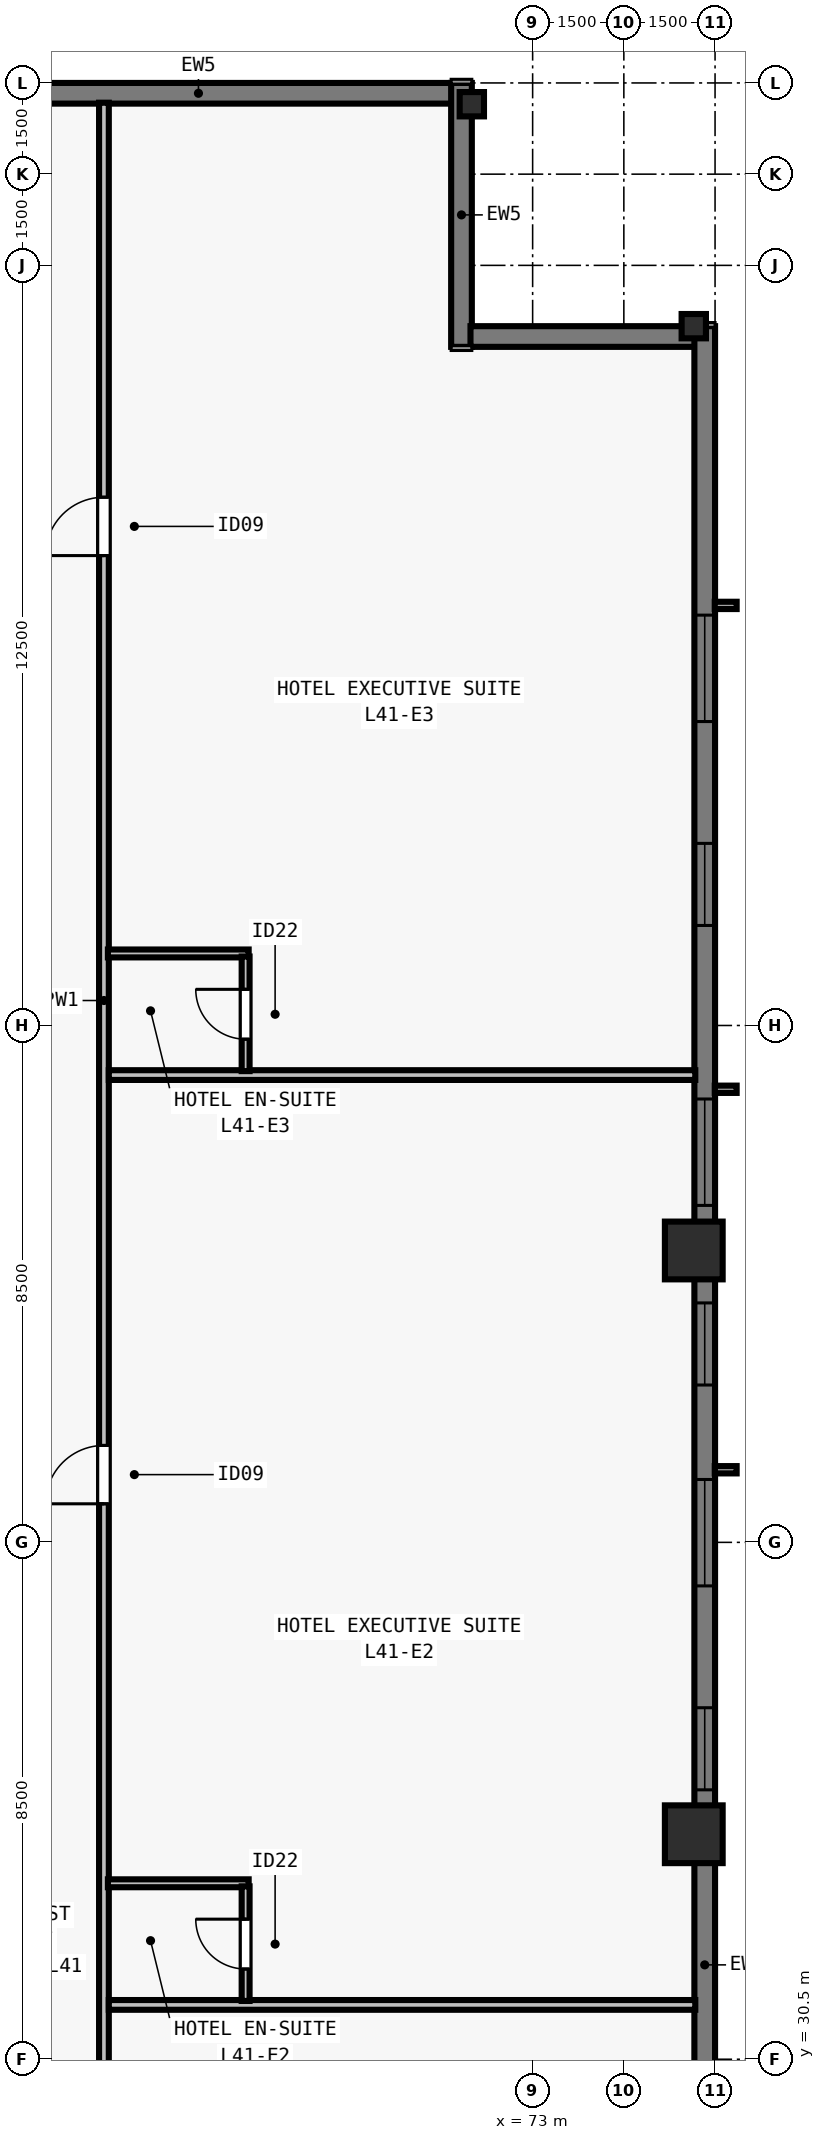
"""IFC4 building model, lengths in metres.
Left out: names, types, materials, properties, quantities, classifications, styles, units other than length and angle.
Written with IfcOpenShell. Run it as: python <this file> out.ifc"""

import sys

from ifc_helpers import new_model, si_unit, direction, frame, frame_2d, origin, origin_2d, place, context, subcontext, project, spatial, rectangle, i_section, extrude, element, fill, save


model = new_model("IFC4")
c1 = context("Model", 3, precision=1e-05, world=origin(), true_north=direction((0.0, 1.0)))
c2 = subcontext(c1, "Body", "Model", "MODEL_VIEW")
j1 = project(units=[si_unit("LENGTHUNIT", "METRE"), si_unit("PLANEANGLEUNIT", "RADIAN")], contexts=[c1])
p1 = place(None, origin())
s1 = spatial("IfcSite", under=j1, at=p1, CompositionType="ELEMENT")
p2 = place(p1, origin())
s2 = spatial("IfcBuilding", under=s1, at=p2, CompositionType="ELEMENT")
p3 = place(p2, frame((0.0, 0.0, 151.5)))
s3 = spatial("IfcBuildingStorey", under=s2, at=p3, CompositionType="ELEMENT", Elevation=151.5)
for number, where, z_axis, x_axis in (
    (1, (75.65, 34.2, 0.0), (0.0, 0.0, 1.0), (0.0, 1.0, 0.0)),
    (2, (75.65, 43.8, 0.0), (0.0, 0.0, 1.0), (0.0, 1.0, 0.0)),
):
    element("IfcColumn", number, at=place(p3, frame(where, z_axis=z_axis, x_axis=x_axis)), inside=s3, PredefinedType="COLUMN", context=c2, shape_type="SweptSolid", body=[
        extrude(rectangle(XDim=0.95, YDim=0.95, at=origin_2d()), origin(), (0.0, 0.0, 1.0), 3.5),
    ])
for number, where, z_axis, x_axis in (
    (3, (75.65, 59.0, 0.0), (0.0, 0.0, 1.0), (0.0, 1.0, 0.0)),
    (4, (72.0, 62.65, 0.0), (0.0, 0.0, 1.0), (1.0, 0.0, 0.0)),
):
    element("IfcColumn", number, at=place(p3, frame(where, z_axis=z_axis, x_axis=x_axis)), inside=s3, PredefinedType="COLUMN", context=c2, shape_type="SweptSolid", body=[
        extrude(i_section(OverallWidth=0.4, OverallDepth=0.4, WebThickness=0.022, FlangeThickness=0.036, at=origin_2d()), origin(), (0.0, 0.0, 1.0), 3.5),
    ])
p4 = place(p3, frame((32.0, 62.83, 0.0), z_axis=(0.0, 0.0, 1.0), x_axis=(1.0, 0.0, 0.0)))
e5 = element("IfcWall", 5, at=p4, inside=s3, PredefinedType="SOLIDWALL", context=c2, shape_type="SweptSolid", body=[
    extrude(rectangle(XDim=39.682, YDim=0.34, at=frame_2d((19.841, 0.0))), origin(), (0.0, 0.0, 1.0), 3.28),
])
p5 = place(p4, frame((4.752, 0.0, 0.8)))
e6 = element("IfcOpeningElement", 6, at=p5, cuts=e5, PredefinedType="OPENING", context=c2, shape_type="SweptSolid", body=[
    extrude(rectangle(XDim=1.75, YDim=1.66, at=frame_2d((0.875, 0.83))), frame((0.0, 0.18, 0.0), z_axis=(0.0, -1.0, 0.0), x_axis=(1.0, 0.0, 0.0)), (0.0, 0.0, 1.0), 0.36),
])
p6 = place(p4, frame((11.859, 0.0, 0.8)))
e7 = element("IfcOpeningElement", 7, at=p6, cuts=e5, PredefinedType="OPENING", context=c2, shape_type="SweptSolid", body=[
    extrude(rectangle(XDim=1.75, YDim=1.66, at=frame_2d((0.875, 0.83))), frame((0.0, 0.18, 0.0), z_axis=(0.0, -1.0, 0.0), x_axis=(1.0, 0.0, 0.0)), (0.0, 0.0, 1.0), 0.36),
])
p7 = place(p4, frame((16.062, 0.0, 0.8)))
e8 = element("IfcOpeningElement", 8, at=p7, cuts=e5, PredefinedType="OPENING", context=c2, shape_type="SweptSolid", body=[
    extrude(rectangle(XDim=1.35, YDim=1.66, at=frame_2d((0.675, 0.83))), frame((0.0, 0.18, 0.0), z_axis=(0.0, -1.0, 0.0), x_axis=(1.0, 0.0, 0.0)), (0.0, 0.0, 1.0), 0.36),
])
p8 = place(p4, frame((17.716, 0.0, 0.8)))
e9 = element("IfcOpeningElement", 9, at=p8, cuts=e5, PredefinedType="OPENING", context=c2, shape_type="SweptSolid", body=[
    extrude(rectangle(XDim=1.75, YDim=1.66, at=frame_2d((0.875, 0.83))), frame((0.0, 0.18, 0.0), z_axis=(0.0, -1.0, 0.0), x_axis=(1.0, 0.0, 0.0)), (0.0, 0.0, 1.0), 0.36),
])
p9 = place(p4, frame((22.719, 0.0, 0.8)))
e10 = element("IfcOpeningElement", 10, at=p9, cuts=e5, PredefinedType="OPENING", context=c2, shape_type="SweptSolid", body=[
    extrude(rectangle(XDim=1.35, YDim=1.66, at=frame_2d((0.675, 0.83))), frame((0.0, 0.18, 0.0), z_axis=(0.0, -1.0, 0.0), x_axis=(1.0, 0.0, 0.0)), (0.0, 0.0, 1.0), 0.36),
])
p10 = place(p4, frame((26.073, 0.0, 0.8)))
e11 = element("IfcOpeningElement", 11, at=p10, cuts=e5, PredefinedType="OPENING", context=c2, shape_type="SweptSolid", body=[
    extrude(rectangle(XDim=1.75, YDim=1.66, at=frame_2d((0.875, 0.83))), frame((0.0, 0.18, 0.0), z_axis=(0.0, -1.0, 0.0), x_axis=(1.0, 0.0, 0.0)), (0.0, 0.0, 1.0), 0.36),
])
p11 = place(p4, frame((29.827, 0.0, 0.8)))
e12 = element("IfcOpeningElement", 12, at=p11, cuts=e5, PredefinedType="OPENING", context=c2, shape_type="SweptSolid", body=[
    extrude(rectangle(XDim=1.35, YDim=1.66, at=frame_2d((0.675, 0.83))), frame((0.0, 0.18, 0.0), z_axis=(0.0, -1.0, 0.0), x_axis=(1.0, 0.0, 0.0)), (0.0, 0.0, 1.0), 0.36),
])
p12 = place(p3, frame((71.83, 63.0, 0.0), z_axis=(0.0, 0.0, 1.0), x_axis=(0.0, -1.0, 0.0)))
e13 = element("IfcWall", 13, at=p12, inside=s3, PredefinedType="SOLIDWALL", context=c2, shape_type="SweptSolid", body=[
    extrude(rectangle(XDim=4.34, YDim=0.34, at=frame_2d((2.17, 0.0))), origin(), (0.0, 0.0, 1.0), 3.28),
])
p13 = place(p3, frame((71.978, 58.83, 0.0), z_axis=(0.0, 0.0, 1.0), x_axis=(1.0, 0.0, 0.0)))
e14 = element("IfcWall", 14, at=p13, inside=s3, PredefinedType="SOLIDWALL", context=c2, shape_type="SweptSolid", body=[
    extrude(rectangle(XDim=3.704, YDim=0.34, at=frame_2d((1.852, 0.0))), origin(), (0.0, 0.0, 1.0), 3.28),
])
p14 = place(p3, frame((75.83, 59.0, 0.0), z_axis=(0.0, 0.0, 1.0), x_axis=(0.0, -1.0, 0.0)))
e15 = element("IfcWall", 15, at=p14, inside=s3, PredefinedType="SOLIDWALL", context=c2, shape_type="SweptSolid", body=[
    extrude(rectangle(XDim=39.682, YDim=0.34, at=frame_2d((19.841, 0.0))), origin(), (0.0, 0.0, 1.0), 3.28),
])
p15 = place(p14, frame((4.752, 0.0, 0.8)))
e16 = element("IfcOpeningElement", 16, at=p15, cuts=e15, PredefinedType="OPENING", context=c2, shape_type="SweptSolid", body=[
    extrude(rectangle(XDim=1.75, YDim=1.66, at=frame_2d((0.875, 0.83))), frame((0.0, 0.18, 0.0), z_axis=(0.0, -1.0, 0.0), x_axis=(1.0, 0.0, 0.0)), (0.0, 0.0, 1.0), 0.36),
])
p16 = place(p14, frame((8.505, 0.0, 0.8)))
e17 = element("IfcOpeningElement", 17, at=p16, cuts=e15, PredefinedType="OPENING", context=c2, shape_type="SweptSolid", body=[
    extrude(rectangle(XDim=1.35, YDim=1.66, at=frame_2d((0.675, 0.83))), frame((0.0, 0.18, 0.0), z_axis=(0.0, -1.0, 0.0), x_axis=(1.0, 0.0, 0.0)), (0.0, 0.0, 1.0), 0.36),
])
p17 = place(p14, frame((12.709, 0.0, 0.8)))
e18 = element("IfcOpeningElement", 18, at=p17, cuts=e15, PredefinedType="OPENING", context=c2, shape_type="SweptSolid", body=[
    extrude(rectangle(XDim=1.75, YDim=1.66, at=frame_2d((0.875, 0.83))), frame((0.0, 0.18, 0.0), z_axis=(0.0, -1.0, 0.0), x_axis=(1.0, 0.0, 0.0)), (0.0, 0.0, 1.0), 0.36),
])
p18 = place(p14, frame((16.062, 0.0, 0.8)))
e19 = element("IfcOpeningElement", 19, at=p18, cuts=e15, PredefinedType="OPENING", context=c2, shape_type="SweptSolid", body=[
    extrude(rectangle(XDim=1.35, YDim=1.66, at=frame_2d((0.675, 0.83))), frame((0.0, 0.18, 0.0), z_axis=(0.0, -1.0, 0.0), x_axis=(1.0, 0.0, 0.0)), (0.0, 0.0, 1.0), 0.36),
])
p19 = place(p14, frame((18.966, 0.0, 0.8)))
e20 = element("IfcOpeningElement", 20, at=p19, cuts=e15, PredefinedType="OPENING", context=c2, shape_type="SweptSolid", body=[
    extrude(rectangle(XDim=1.75, YDim=1.66, at=frame_2d((0.875, 0.83))), frame((0.0, 0.18, 0.0), z_axis=(0.0, -1.0, 0.0), x_axis=(1.0, 0.0, 0.0)), (0.0, 0.0, 1.0), 0.36),
])
p20 = place(p14, frame((22.719, 0.0, 0.8)))
e21 = element("IfcOpeningElement", 21, at=p20, cuts=e15, PredefinedType="OPENING", context=c2, shape_type="SweptSolid", body=[
    extrude(rectangle(XDim=1.35, YDim=1.66, at=frame_2d((0.675, 0.83))), frame((0.0, 0.18, 0.0), z_axis=(0.0, -1.0, 0.0), x_axis=(1.0, 0.0, 0.0)), (0.0, 0.0, 1.0), 0.36),
])
p21 = place(p14, frame((29.827, 0.0, 0.8)))
e22 = element("IfcOpeningElement", 22, at=p21, cuts=e15, PredefinedType="OPENING", context=c2, shape_type="SweptSolid", body=[
    extrude(rectangle(XDim=1.35, YDim=1.66, at=frame_2d((0.675, 0.83))), frame((0.0, 0.18, 0.0), z_axis=(0.0, -1.0, 0.0), x_axis=(1.0, 0.0, 0.0)), (0.0, 0.0, 1.0), 0.36),
])
p22 = place(p14, frame((33.18, 0.0, 0.8)))
e23 = element("IfcOpeningElement", 23, at=p22, cuts=e15, PredefinedType="OPENING", context=c2, shape_type="SweptSolid", body=[
    extrude(rectangle(XDim=1.75, YDim=1.66, at=frame_2d((0.875, 0.83))), frame((0.0, 0.18, 0.0), z_axis=(0.0, -1.0, 0.0), x_axis=(1.0, 0.0, 0.0)), (0.0, 0.0, 1.0), 0.36),
])
p23 = place(p3, frame((65.95, 15.325, 0.0), z_axis=(0.0, 0.0, 1.0), x_axis=(0.0, 1.0, 0.0)))
e24 = element("IfcWall", 24, at=p23, inside=s3, PredefinedType="PARTITIONING", context=c2, shape_type="SweptSolid", body=[
    extrude(rectangle(XDim=47.35, YDim=0.16, at=frame_2d((23.675, 0.0))), origin(), (0.0, 0.0, 1.0), 2.555),
])
p24 = place(p23, frame((8.902, 0.0, 0.0)))
e25 = element("IfcOpeningElement", 25, at=p24, cuts=e24, PredefinedType="OPENING", context=c2, shape_type="SweptSolid", body=[
    extrude(rectangle(XDim=0.96, YDim=2.15, at=frame_2d((0.48, 1.075))), frame((0.0, 0.09, 0.0), z_axis=(0.0, -1.0, 0.0), x_axis=(1.0, 0.0, 0.0)), (0.0, 0.0, 1.0), 0.18),
])
p25 = place(p23, frame((24.309, 0.0, 0.0)))
e26 = element("IfcOpeningElement", 26, at=p25, cuts=e24, PredefinedType="OPENING", context=c2, shape_type="SweptSolid", body=[
    extrude(rectangle(XDim=0.96, YDim=2.15, at=frame_2d((0.48, 1.075))), frame((0.0, 0.09, 0.0), z_axis=(0.0, -1.0, 0.0), x_axis=(1.0, 0.0, 0.0)), (0.0, 0.0, 1.0), 0.18),
])
p26 = place(p23, frame((39.902, 0.0, 0.0)))
e27 = element("IfcOpeningElement", 27, at=p26, cuts=e24, PredefinedType="OPENING", context=c2, shape_type="SweptSolid", body=[
    extrude(rectangle(XDim=0.96, YDim=2.15, at=frame_2d((0.48, 1.075))), frame((0.0, 0.09, 0.0), z_axis=(0.0, -1.0, 0.0), x_axis=(1.0, 0.0, 0.0)), (0.0, 0.0, 1.0), 0.18),
])
p27 = place(p3, frame((66.03, 31.394, 0.0), z_axis=(0.0, 0.0, 1.0), x_axis=(1.0, 0.0, 0.0)))
e28 = element("IfcWall", 28, at=p27, inside=s3, PredefinedType="PARTITIONING", context=c2, shape_type="SweptSolid", body=[
    extrude(rectangle(XDim=9.645, YDim=0.16, at=frame_2d((4.823, 0.0))), origin(), (0.0, 0.0, 1.0), 3.28),
])
p28 = place(p3, frame((66.015, 33.394, 0.0), z_axis=(0.0, 0.0, 1.0), x_axis=(1.0, 0.0, 0.0)))
e29 = element("IfcWall", 29, at=p28, inside=s3, PredefinedType="PLUMBINGWALL", context=c2, shape_type="SweptSolid", body=[
    extrude(rectangle(XDim=2.315, YDim=0.13, at=frame_2d((1.158, 0.0))), origin(), (0.0, 0.0, 1.0), 3.28),
])
p29 = place(p3, frame((68.28, 31.458, 0.0), z_axis=(0.0, 0.0, 1.0), x_axis=(0.0, 1.0, 0.0)))
e30 = element("IfcWall", 30, at=p29, inside=s3, PredefinedType="PLUMBINGWALL", context=c2, shape_type="SweptSolid", body=[
    extrude(rectangle(XDim=1.885, YDim=0.13, at=frame_2d((0.942, 0.0))), origin(), (0.0, 0.0, 1.0), 3.28),
])
p30 = place(p29, frame((0.525, 0.0, 0.0)))
e31 = element("IfcOpeningElement", 31, at=p30, cuts=e30, PredefinedType="OPENING", context=c2, shape_type="SweptSolid", body=[
    extrude(rectangle(XDim=0.82, YDim=2.1, at=frame_2d((0.41, 1.05))), frame((0.0, 0.075, 0.0), z_axis=(0.0, -1.0, 0.0), x_axis=(1.0, 0.0, 0.0)), (0.0, 0.0, 1.0), 0.15),
])
p31 = place(p3, frame((66.03, 46.685, 0.0), z_axis=(0.0, 0.0, 1.0), x_axis=(1.0, 0.0, 0.0)))
e32 = element("IfcWall", 32, at=p31, inside=s3, PredefinedType="PARTITIONING", context=c2, shape_type="SweptSolid", body=[
    extrude(rectangle(XDim=9.645, YDim=0.16, at=frame_2d((4.823, 0.0))), origin(), (0.0, 0.0, 1.0), 3.28),
])
p32 = place(p3, frame((66.015, 48.685, 0.0), z_axis=(0.0, 0.0, 1.0), x_axis=(1.0, 0.0, 0.0)))
e33 = element("IfcWall", 33, at=p32, inside=s3, PredefinedType="PLUMBINGWALL", context=c2, shape_type="SweptSolid", body=[
    extrude(rectangle(XDim=2.315, YDim=0.13, at=frame_2d((1.158, 0.0))), origin(), (0.0, 0.0, 1.0), 3.28),
])
p33 = place(p3, frame((68.28, 46.75, 0.0), z_axis=(0.0, 0.0, 1.0), x_axis=(0.0, 1.0, 0.0)))
e34 = element("IfcWall", 34, at=p33, inside=s3, PredefinedType="PLUMBINGWALL", context=c2, shape_type="SweptSolid", body=[
    extrude(rectangle(XDim=1.885, YDim=0.13, at=frame_2d((0.942, 0.0))), origin(), (0.0, 0.0, 1.0), 3.28),
])
p34 = place(p33, frame((0.525, 0.0, 0.0)))
e35 = element("IfcOpeningElement", 35, at=p34, cuts=e34, PredefinedType="OPENING", context=c2, shape_type="SweptSolid", body=[
    extrude(rectangle(XDim=0.82, YDim=2.1, at=frame_2d((0.41, 1.05))), frame((0.0, 0.075, 0.0), z_axis=(0.0, -1.0, 0.0), x_axis=(1.0, 0.0, 0.0)), (0.0, 0.0, 1.0), 0.15),
])
p35 = place(p15, origin())
e36 = element("IfcWindow", 36, at=p35, inside=s3, PartitioningType="SINGLE_PANEL", PredefinedType="WINDOW", context=c2, shape_type="SweptSolid", body=[
    extrude(rectangle(XDim=1.75, YDim=1.66, at=frame_2d((0.875, 0.83))), frame((0.0, -0.05, 0.0), z_axis=(0.0, -1.0, 0.0), x_axis=(1.0, 0.0, 0.0)), (0.0, 0.0, 1.0), 0.06),
])
fill(e16, e36)
p36 = place(p16, origin())
e37 = element("IfcWindow", 37, at=p36, inside=s3, PartitioningType="SINGLE_PANEL", PredefinedType="WINDOW", context=c2, shape_type="SweptSolid", body=[
    extrude(rectangle(XDim=1.35, YDim=1.66, at=frame_2d((0.675, 0.83))), frame((0.0, -0.05, 0.0), z_axis=(0.0, -1.0, 0.0), x_axis=(1.0, 0.0, 0.0)), (0.0, 0.0, 1.0), 0.06),
])
fill(e17, e37)
p37 = place(p17, origin())
e38 = element("IfcWindow", 38, at=p37, inside=s3, PartitioningType="SINGLE_PANEL", PredefinedType="WINDOW", context=c2, shape_type="SweptSolid", body=[
    extrude(rectangle(XDim=1.75, YDim=1.66, at=frame_2d((0.875, 0.83))), frame((0.0, -0.05, 0.0), z_axis=(0.0, -1.0, 0.0), x_axis=(1.0, 0.0, 0.0)), (0.0, 0.0, 1.0), 0.06),
])
fill(e18, e38)
p38 = place(p18, origin())
e39 = element("IfcWindow", 39, at=p38, inside=s3, PartitioningType="SINGLE_PANEL", PredefinedType="WINDOW", context=c2, shape_type="SweptSolid", body=[
    extrude(rectangle(XDim=1.35, YDim=1.66, at=frame_2d((0.675, 0.83))), frame((0.0, -0.05, 0.0), z_axis=(0.0, -1.0, 0.0), x_axis=(1.0, 0.0, 0.0)), (0.0, 0.0, 1.0), 0.06),
])
fill(e19, e39)
p39 = place(p19, origin())
e40 = element("IfcWindow", 40, at=p39, inside=s3, PartitioningType="SINGLE_PANEL", PredefinedType="WINDOW", context=c2, shape_type="SweptSolid", body=[
    extrude(rectangle(XDim=1.75, YDim=1.66, at=frame_2d((0.875, 0.83))), frame((0.0, -0.05, 0.0), z_axis=(0.0, -1.0, 0.0), x_axis=(1.0, 0.0, 0.0)), (0.0, 0.0, 1.0), 0.06),
])
fill(e20, e40)
p40 = place(p20, origin())
e41 = element("IfcWindow", 41, at=p40, inside=s3, PartitioningType="SINGLE_PANEL", PredefinedType="WINDOW", context=c2, shape_type="SweptSolid", body=[
    extrude(rectangle(XDim=1.35, YDim=1.66, at=frame_2d((0.675, 0.83))), frame((0.0, -0.05, 0.0), z_axis=(0.0, -1.0, 0.0), x_axis=(1.0, 0.0, 0.0)), (0.0, 0.0, 1.0), 0.06),
])
fill(e21, e41)
p41 = place(p30, origin())
e42 = element("IfcDoor", 42, at=p41, inside=s3, OperationType="SINGLE_SWING_RIGHT", PredefinedType="DOOR", context=c2, shape_type="SweptSolid", body=[
    extrude(rectangle(XDim=0.82, YDim=2.1, at=frame_2d((0.41, 1.05))), frame((0.0, 0.025, 0.0), z_axis=(0.0, -1.0, 0.0), x_axis=(1.0, 0.0, 0.0)), (0.0, 0.0, 1.0), 0.05),
])
fill(e31, e42)
p42 = place(p25, origin())
e43 = element("IfcDoor", 43, at=p42, inside=s3, OperationType="SINGLE_SWING_LEFT", PredefinedType="DOOR", context=c2, shape_type="SweptSolid", body=[
    extrude(rectangle(XDim=0.96, YDim=2.15, at=frame_2d((0.48, 1.075))), frame((0.0, 0.025, 0.0), z_axis=(0.0, -1.0, 0.0), x_axis=(1.0, 0.0, 0.0)), (0.0, 0.0, 1.0), 0.05),
])
fill(e26, e43)
p43 = place(p34, origin())
e44 = element("IfcDoor", 44, at=p43, inside=s3, OperationType="SINGLE_SWING_RIGHT", PredefinedType="DOOR", context=c2, shape_type="SweptSolid", body=[
    extrude(rectangle(XDim=0.82, YDim=2.1, at=frame_2d((0.41, 1.05))), frame((0.0, 0.025, 0.0), z_axis=(0.0, -1.0, 0.0), x_axis=(1.0, 0.0, 0.0)), (0.0, 0.0, 1.0), 0.05),
])
fill(e35, e44)
p44 = place(p26, origin())
e45 = element("IfcDoor", 45, at=p44, inside=s3, OperationType="SINGLE_SWING_LEFT", PredefinedType="DOOR", context=c2, shape_type="SweptSolid", body=[
    extrude(rectangle(XDim=0.96, YDim=2.15, at=frame_2d((0.48, 1.075))), frame((0.0, 0.025, 0.0), z_axis=(0.0, -1.0, 0.0), x_axis=(1.0, 0.0, 0.0)), (0.0, 0.0, 1.0), 0.05),
])
fill(e27, e45)
save(model, sys.argv[1])
